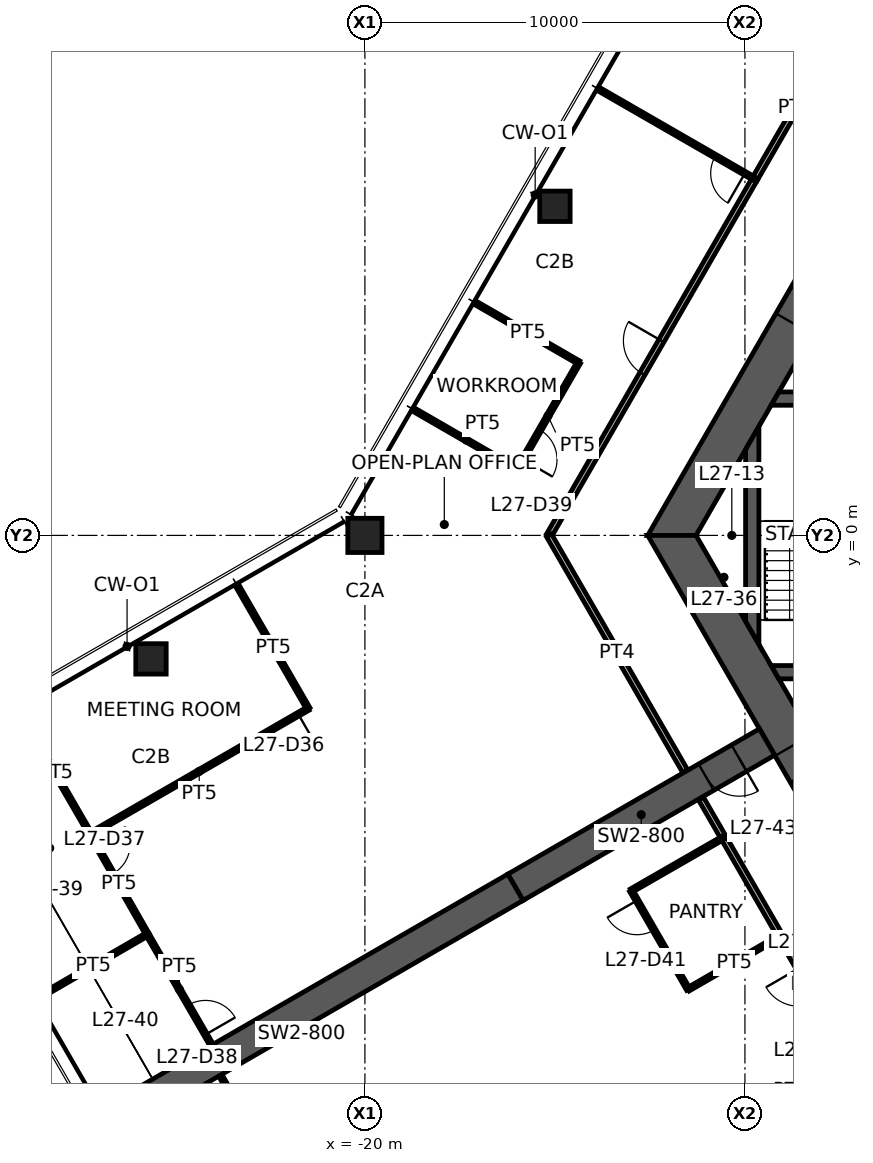
"""IFC4 building model, lengths in metres.
Left out: names, types, materials, properties, quantities, classifications, styles, units other than length and angle.
Written with IfcOpenShell. Run it as: python <this file> out.ifc"""

import sys

from ifc_helpers import new_model, si_unit, direction, frame, frame_2d, origin, origin_2d, place, context, subcontext, project, spatial, polyline, rectangle, hollow_rectangle, outline, extrude, element, fill, save


model = new_model("IFC4")
c1 = context("Model", 3, precision=1e-05, world=origin(), true_north=direction((0.0, 1.0)))
c2 = subcontext(c1, "Body", "Model", "MODEL_VIEW")
j1 = project(units=[si_unit("LENGTHUNIT", "METRE"), si_unit("PLANEANGLEUNIT", "RADIAN")], contexts=[c1])
p1 = place(None, origin())
s1 = spatial("IfcSite", under=j1, at=p1, CompositionType="ELEMENT")
p2 = place(p1, origin())
s2 = spatial("IfcBuilding", under=s1, at=p2, CompositionType="ELEMENT")
p3 = place(p2, frame((0.0, 0.0, 108.0)))
s3 = spatial("IfcBuildingStorey", under=s2, at=p3, CompositionType="ELEMENT", Elevation=108.0)
p4 = place(p3, frame((-20.0, 0.0, 0.0), z_axis=(0.0, 0.0, 1.0), x_axis=(1.0, 0.0, 0.0)))
e1 = element("IfcColumn", 1, at=p4, inside=s3, PredefinedType="COLUMN", context=c2, shape_type="SweptSolid", body=[
    extrude(hollow_rectangle(XDim=0.9, YDim=0.9, WallThickness=0.055, at=origin_2d()), origin(), (0.0, 0.0, 1.0), 3.9),
])
for number, where, z_axis, x_axis in (
    (2, (-15.0, 8.66, 0.0), (0.0, 0.0, 1.0), (1.0, 0.0, 0.0)),
    (3, (-25.629, -3.25, 0.0), (0.0, 0.0, 1.0), (1.0, 0.0, 0.0)),
):
    element("IfcColumn", number, at=place(p3, frame(where, z_axis=z_axis, x_axis=x_axis)), inside=s3, PredefinedType="COLUMN", context=c2, shape_type="SweptSolid", body=[
        extrude(hollow_rectangle(XDim=0.8, YDim=0.8, WallThickness=0.045, at=origin_2d()), origin(), (0.0, 0.0, 1.0), 3.9),
    ])
p5 = place(p3, frame((-5.961, 10.325, 0.0), z_axis=(0.0, 0.0, 1.0), x_axis=(-0.500004296715, -0.866022923061, 0.0)))
e4 = element("IfcWall", 4, at=p5, inside=s3, PredefinedType="SHEAR", context=c2, shape_type="SweptSolid", body=[
    extrude(outline(polyline([(-0.318, -0.55), (4.494, -0.55), (5.494, -0.55), (12.24, -0.55), (11.605, 0.55), (5.494, 0.55), (4.494, 0.55), (0.318, 0.55), (-0.318, -0.55)])), origin(), (0.0, 0.0, 1.0), 3.9),
])
p6 = place(p5, frame((4.494, 0.0, 0.0)))
e5 = element("IfcOpeningElement", 5, at=p6, cuts=e4, PredefinedType="OPENING", context=c2, shape_type="SweptSolid", body=[
    extrude(rectangle(XDim=1.0, YDim=2.1, at=frame_2d((0.5, 1.05))), frame((0.0, 0.56, 0.0), z_axis=(0.0, -1.0, 0.0), x_axis=(1.0, 0.0, 0.0)), (0.0, 0.0, 1.0), 1.12),
])
p7 = place(p3, frame((-11.922, 0.0, 0.0), z_axis=(0.0, 0.0, 1.0), x_axis=(0.500004296715, -0.866022923061, 0.0)))
e6 = element("IfcWall", 6, at=p7, inside=s3, PredefinedType="SHEAR", context=c2, shape_type="SweptSolid", body=[
    extrude(outline(polyline([(-0.318, -0.55), (6.381, -0.55), (7.181, -0.55), (12.24, -0.55), (11.605, 0.55), (7.181, 0.55), (6.381, 0.55), (0.318, 0.55), (-0.318, -0.55)])), origin(), (0.0, 0.0, 1.0), 3.9),
])
p8 = place(p7, frame((6.381, 0.0, 0.0)))
e7 = element("IfcOpeningElement", 7, at=p8, cuts=e6, PredefinedType="OPENING", context=c2, shape_type="SweptSolid", body=[
    extrude(rectangle(XDim=0.8, YDim=2.1, at=frame_2d((0.4, 1.05))), frame((0.0, 0.56, 0.0), z_axis=(0.0, -1.0, 0.0), x_axis=(1.0, 0.0, 0.0)), (0.0, 0.0, 1.0), 1.12),
])
p9 = place(p3, frame((-9.418, -5.438, 0.0), z_axis=(0.0, 0.0, 1.0), x_axis=(-0.866029782078, -0.499992416496, 0.0)))
e8 = element("IfcWall", 8, at=p9, inside=s3, PredefinedType="SHEAR", context=c2, shape_type="SweptSolid", body=[
    extrude(rectangle(XDim=7.646, YDim=0.8, at=frame_2d((3.823, 0.0))), origin(), (0.0, 0.0, 1.0), 3.9),
])
p10 = place(p9, frame((0.85, 0.0, 0.0)))
e9 = element("IfcOpeningElement", 9, at=p10, cuts=e8, PredefinedType="OPENING", context=c2, shape_type="SweptSolid", body=[
    extrude(rectangle(XDim=1.0, YDim=2.1, at=frame_2d((0.5, 1.05))), frame((0.0, 0.41, 0.0), z_axis=(0.0, -1.0, 0.0), x_axis=(1.0, 0.0, 0.0)), (0.0, 0.0, 1.0), 0.82),
])
p11 = place(p3, frame((-16.039, -9.26, 0.0), z_axis=(0.0, 0.0, 1.0), x_axis=(-0.866024837091, -0.50000098154, 0.0)))
e10 = element("IfcWall", 10, at=p11, inside=s3, PredefinedType="SHEAR", context=c2, shape_type="SweptSolid", body=[
    extrude(rectangle(XDim=13.0, YDim=0.8, at=frame_2d((6.5, 0.0))), origin(), (0.0, 0.0, 1.0), 3.9),
])
p12 = place(p3, frame((-9.209, 3.6, 0.0), z_axis=(0.0, 0.0, 1.0), x_axis=(1.0, 0.0, 0.0)))
e11 = element("IfcWall", 11, at=p12, inside=s3, PredefinedType="SHEAR", context=c2, shape_type="SweptSolid", body=[
    extrude(outline(polyline([(-0.101, -0.175), (3.209, -0.175), (4.209, -0.175), (5.609, -0.175), (6.709, -0.175), (7.784, -0.175), (7.784, 0.175), (6.709, 0.175), (5.609, 0.175), (4.209, 0.175), (3.209, 0.175), (0.101, 0.175), (-0.101, -0.175)])), origin(), (0.0, 0.0, 1.0), 3.9),
])
p13 = place(p12, frame((3.209, 0.0, 0.0)))
e12 = element("IfcOpeningElement", 12, at=p13, cuts=e11, PredefinedType="OPENING", context=c2, shape_type="SweptSolid", body=[
    extrude(rectangle(XDim=1.0, YDim=2.1, at=frame_2d((0.5, 1.05))), frame((0.0, 0.185, 0.0), z_axis=(0.0, -1.0, 0.0), x_axis=(1.0, 0.0, 0.0)), (0.0, 0.0, 1.0), 0.37),
])
p14 = place(p12, frame((5.609, 0.0, 0.0)))
e13 = element("IfcOpeningElement", 13, at=p14, cuts=e11, PredefinedType="OPENING", context=c2, shape_type="SweptSolid", body=[
    extrude(rectangle(XDim=1.1, YDim=2.1, at=frame_2d((0.55, 1.05))), frame((0.0, 0.185, 0.0), z_axis=(0.0, -1.0, 0.0), x_axis=(1.0, 0.0, 0.0)), (0.0, 0.0, 1.0), 0.37),
])
p15 = place(p3, frame((-9.209, -3.6, 0.0), z_axis=(0.0, 0.0, 1.0), x_axis=(1.0, 0.0, 0.0)))
e14 = element("IfcWall", 14, at=p15, inside=s3, PredefinedType="SHEAR", context=c2, shape_type="SweptSolid", body=[
    extrude(outline(polyline([(0.101, -0.175), (3.059, -0.175), (4.359, -0.175), (5.609, -0.175), (6.709, -0.175), (7.784, -0.175), (7.784, 0.175), (6.709, 0.175), (5.609, 0.175), (4.359, 0.175), (3.059, 0.175), (-0.101, 0.175), (0.101, -0.175)])), origin(), (0.0, 0.0, 1.0), 3.9),
])
p16 = place(p15, frame((5.609, 0.0, 0.0)))
e15 = element("IfcOpeningElement", 15, at=p16, cuts=e14, PredefinedType="OPENING", context=c2, shape_type="SweptSolid", body=[
    extrude(rectangle(XDim=1.1, YDim=2.1, at=frame_2d((0.55, 1.05))), frame((0.0, 0.185, 0.0), z_axis=(0.0, -1.0, 0.0), x_axis=(1.0, 0.0, 0.0)), (0.0, 0.0, 1.0), 0.37),
])
p17 = place(p15, frame((3.059, 0.0, 0.0)))
e16 = element("IfcOpeningElement", 16, at=p17, cuts=e14, PredefinedType="OPENING", context=c2, shape_type="SweptSolid", body=[
    extrude(rectangle(XDim=1.3, YDim=2.1, at=frame_2d((0.65, 1.05))), frame((0.0, 0.185, 0.0), z_axis=(0.0, -1.0, 0.0), x_axis=(1.0, 0.0, 0.0)), (0.0, 0.0, 1.0), 0.37),
])
p18 = place(p3, frame((-9.808, -2.562, 0.0), z_axis=(0.0, 0.0, 1.0), x_axis=(0.0, 1.0, 0.0)))
e17 = element("IfcWall", 17, at=p18, inside=s3, PredefinedType="SHEAR", context=c2, shape_type="SweptSolid", body=[
    extrude(outline(polyline([(-0.303, -0.175), (5.428, -0.175), (4.821, 0.175), (0.303, 0.175), (-0.303, -0.175)])), origin(), (0.0, 0.0, 1.0), 3.9),
])
p19 = place(p3, frame((-7.578, -13.125, 0.0), z_axis=(0.0, 0.0, 1.0), x_axis=(-0.500008905493, -0.866020262135, 0.0)))
e18 = element("IfcWall", 18, at=p19, inside=s3, PredefinedType="PARTITIONING", context=c2, shape_type="SweptSolid", body=[
    extrude(rectangle(XDim=4.845, YDim=0.175, at=frame_2d((2.422, 0.0))), origin(), (0.0, 0.0, 1.0), 3.05),
])
p20 = place(p19, frame((0.7, 0.0, 0.0)))
e19 = element("IfcOpeningElement", 19, at=p20, cuts=e18, PredefinedType="OPENING", context=c2, shape_type="SweptSolid", body=[
    extrude(rectangle(XDim=1.0, YDim=2.1, at=frame_2d((0.5, 1.05))), frame((0.0, 0.098, 0.0), z_axis=(0.0, -1.0, 0.0), x_axis=(1.0, 0.0, 0.0)), (0.0, 0.0, 1.0), 0.195),
])
p21 = place(p3, frame((-9.746, 9.37, 0.0), z_axis=(0.0, 0.0, 1.0), x_axis=(0.499980509014, 0.866036656618, 0.0)))
e20 = element("IfcWall", 20, at=p21, inside=s3, PredefinedType="PARTITIONING", context=c2, shape_type="SweptSolid", body=[
    extrude(rectangle(XDim=4.313, YDim=0.15, at=frame_2d((2.157, 0.0))), origin(), (0.0, 0.0, 1.0), 2.95),
])
p22 = place(p3, frame((-15.156, 0.0, 0.0), z_axis=(0.0, 0.0, 1.0), x_axis=(0.500006743721, 0.866021510261, 0.0)))
e21 = element("IfcWall", 21, at=p22, inside=s3, PredefinedType="PARTITIONING", context=c2, shape_type="SweptSolid", body=[
    extrude(rectangle(XDim=10.828, YDim=0.15, at=frame_2d((5.414, 0.0))), origin(), (0.0, 0.0, 1.0), 2.95),
])
p23 = place(p22, frame((4.914, 0.0, 0.0)))
e22 = element("IfcOpeningElement", 22, at=p23, cuts=e21, PredefinedType="OPENING", context=c2, shape_type="SweptSolid", body=[
    extrude(rectangle(XDim=1.0, YDim=2.1, at=frame_2d((0.5, 1.05))), frame((0.0, 0.085, 0.0), z_axis=(0.0, -1.0, 0.0), x_axis=(1.0, 0.0, 0.0)), (0.0, 0.0, 1.0), 0.17),
])
p24 = place(p3, frame((-11.577, -6.199, 0.0), z_axis=(0.0, 0.0, 1.0), x_axis=(-0.500001961223, 0.866024271469, 0.0)))
e23 = element("IfcWall", 23, at=p24, inside=s3, PredefinedType="PARTITIONING", context=c2, shape_type="SweptSolid", body=[
    extrude(rectangle(XDim=7.158, YDim=0.15, at=frame_2d((3.579, 0.0))), origin(), (0.0, 0.0, 1.0), 2.95),
])
p25 = place(p3, frame((-9.741, 9.378, 0.0), z_axis=(0.0, 0.0, 1.0), x_axis=(-0.866493666502, 0.499188066675, 0.0)))
e24 = element("IfcWall", 24, at=p25, inside=s3, PredefinedType="PARTITIONING", context=c2, shape_type="SweptSolid", body=[
    extrude(rectangle(XDim=4.72, YDim=0.1, at=frame_2d((2.36, 0.0))), origin(), (0.0, 0.0, 1.0), 2.95),
])
p26 = place(p25, frame((0.3, 0.0, 0.0)))
e25 = element("IfcOpeningElement", 25, at=p26, cuts=e24, PredefinedType="OPENING", context=c2, shape_type="SweptSolid", body=[
    extrude(rectangle(XDim=0.9, YDim=2.1, at=frame_2d((0.45, 1.05))), frame((0.0, 0.06, 0.0), z_axis=(0.0, -1.0, 0.0), x_axis=(1.0, 0.0, 0.0)), (0.0, 0.0, 1.0), 0.12),
])
p27 = place(p3, frame((-27.22, -7.864, 0.0), z_axis=(0.0, 0.0, 1.0), x_axis=(-0.501296359072, 0.86527565572, 0.0)))
e26 = element("IfcWall", 26, at=p27, inside=s3, PredefinedType="PARTITIONING", context=c2, shape_type="SweptSolid", body=[
    extrude(rectangle(XDim=3.7, YDim=0.1, at=frame_2d((1.85, 0.0))), origin(), (0.0, 0.0, 1.0), 2.95),
])
p28 = place(p3, frame((-23.332, -1.37, 0.0), z_axis=(0.0, 0.0, 1.0), x_axis=(0.500013413428, -0.866017659399, 0.0)))
e27 = element("IfcWall", 27, at=p28, inside=s3, PredefinedType="PARTITIONING", context=c2, shape_type="SweptSolid", body=[
    extrude(rectangle(XDim=3.68, YDim=0.1, at=frame_2d((1.84, 0.0))), origin(), (0.0, 0.0, 1.0), 2.95),
])
p29 = place(p3, frame((-21.492, -4.557, 0.0), z_axis=(0.0, 0.0, 1.0), x_axis=(-0.866343956507, -0.499447844147, 0.0)))
e28 = element("IfcWall", 28, at=p29, inside=s3, PredefinedType="PARTITIONING", context=c2, shape_type="SweptSolid", body=[
    extrude(rectangle(XDim=6.62, YDim=0.1, at=frame_2d((3.31, 0.0))), origin(), (0.0, 0.0, 1.0), 2.95),
])
p30 = place(p29, frame((0.3, 0.0, 0.0)))
e29 = element("IfcOpeningElement", 29, at=p30, cuts=e28, PredefinedType="OPENING", context=c2, shape_type="SweptSolid", body=[
    extrude(rectangle(XDim=0.9, YDim=2.1, at=frame_2d((0.45, 1.05))), frame((0.0, 0.06, 0.0), z_axis=(0.0, -1.0, 0.0), x_axis=(1.0, 0.0, 0.0)), (0.0, 0.0, 1.0), 0.12),
])
p31 = place(p3, frame((-25.719, -10.493, 0.0), z_axis=(0.0, 0.0, 1.0), x_axis=(-0.865269267775, -0.501307384988, 0.0)))
e30 = element("IfcWall", 30, at=p31, inside=s3, PredefinedType="PARTITIONING", context=c2, shape_type="SweptSolid", body=[
    extrude(rectangle(XDim=3.301, YDim=0.1, at=frame_2d((1.65, 0.0))), origin(), (0.0, 0.0, 1.0), 2.95),
])
p32 = place(p3, frame((-27.227, -7.863, 0.0), z_axis=(0.0, 0.0, 1.0), x_axis=(0.495913871635, -0.868371712989, 0.0)))
e31 = element("IfcWall", 31, at=p32, inside=s3, PredefinedType="PARTITIONING", context=c2, shape_type="SweptSolid", body=[
    extrude(rectangle(XDim=3.038, YDim=0.1, at=frame_2d((1.519, 0.0))), origin(), (0.0, 0.0, 1.0), 2.95),
])
p33 = place(p32, frame((0.3, 0.0, 0.0)))
e32 = element("IfcOpeningElement", 32, at=p33, cuts=e31, PredefinedType="OPENING", context=c2, shape_type="SweptSolid", body=[
    extrude(rectangle(XDim=0.9, YDim=2.1, at=frame_2d((0.45, 1.05))), frame((0.0, 0.06, 0.0), z_axis=(0.0, -1.0, 0.0), x_axis=(1.0, 0.0, 0.0)), (0.0, 0.0, 1.0), 0.12),
])
p34 = place(p3, frame((-25.72, -10.5, 0.0), z_axis=(0.0, 0.0, 1.0), x_axis=(0.501088030279, -0.865396317251, 0.0)))
e33 = element("IfcWall", 33, at=p34, inside=s3, PredefinedType="PARTITIONING", context=c2, shape_type="SweptSolid", body=[
    extrude(rectangle(XDim=3.347, YDim=0.1, at=frame_2d((1.673, 0.0))), origin(), (0.0, 0.0, 1.0), 2.95),
])
p35 = place(p34, frame((2.147, 0.0, 0.0)))
e34 = element("IfcOpeningElement", 34, at=p35, cuts=e33, PredefinedType="OPENING", context=c2, shape_type="SweptSolid", body=[
    extrude(rectangle(XDim=0.9, YDim=2.1, at=frame_2d((0.45, 1.05))), frame((0.0, 0.06, 0.0), z_axis=(0.0, -1.0, 0.0), x_axis=(1.0, 0.0, 0.0)), (0.0, 0.0, 1.0), 0.12),
])
p36 = place(p3, frame((-17.056, 6.099, 0.0), z_axis=(0.0, 0.0, 1.0), x_axis=(0.86600983753, -0.500026960575, 0.0)))
e35 = element("IfcWall", 35, at=p36, inside=s3, PredefinedType="PARTITIONING", context=c2, shape_type="SweptSolid", body=[
    extrude(rectangle(XDim=3.1, YDim=0.1, at=frame_2d((1.55, 0.0))), origin(), (0.0, 0.0, 1.0), 2.95),
])
p37 = place(p3, frame((-15.995, 1.737, 0.0), z_axis=(0.0, 0.0, 1.0), x_axis=(-0.866029832698, 0.499992328818, 0.0)))
e36 = element("IfcWall", 36, at=p37, inside=s3, PredefinedType="PARTITIONING", context=c2, shape_type="SweptSolid", body=[
    extrude(rectangle(XDim=3.08, YDim=0.1, at=frame_2d((1.54, 0.0))), origin(), (0.0, 0.0, 1.0), 2.95),
])
p38 = place(p3, frame((-14.372, 4.549, 0.0), z_axis=(0.0, 0.0, 1.0), x_axis=(-0.499956811548, -0.866050337213, 0.0)))
e37 = element("IfcWall", 37, at=p38, inside=s3, PredefinedType="PARTITIONING", context=c2, shape_type="SweptSolid", body=[
    extrude(rectangle(XDim=3.246, YDim=0.1, at=frame_2d((1.623, 0.0))), origin(), (0.0, 0.0, 1.0), 2.95),
])
p39 = place(p38, frame((2.046, 0.0, 0.0)))
e38 = element("IfcOpeningElement", 38, at=p39, cuts=e37, PredefinedType="OPENING", context=c2, shape_type="SweptSolid", body=[
    extrude(rectangle(XDim=0.9, YDim=2.1, at=frame_2d((0.45, 1.05))), frame((0.0, 0.06, 0.0), z_axis=(0.0, -1.0, 0.0), x_axis=(1.0, 0.0, 0.0)), (0.0, 0.0, 1.0), 0.12),
])
p40 = place(p3, frame((-9.064, -10.551, 0.0), z_axis=(0.0, 0.0, 1.0), x_axis=(-0.499977562641, 0.866038357612, 0.0)))
e39 = element("IfcWall", 39, at=p40, inside=s3, PredefinedType="PARTITIONING", context=c2, shape_type="SweptSolid", body=[
    extrude(rectangle(XDim=3.01, YDim=0.15, at=frame_2d((1.505, 0.0))), origin(), (0.0, 0.0, 1.0), 2.95),
])
p41 = place(p3, frame((-10.564, -7.952, 0.0), z_axis=(0.0, 0.0, 1.0), x_axis=(-0.500085263423, 0.865976171327, 0.0)))
e40 = element("IfcWall", 40, at=p41, inside=s3, PredefinedType="PARTITIONING", context=c2, shape_type="SweptSolid", body=[
    extrude(rectangle(XDim=1.184, YDim=0.15, at=frame_2d((0.592, 0.0))), origin(), (0.0, 0.0, 1.0), 2.95),
])
p42 = place(p3, frame((-7.589, -13.105, 0.0), z_axis=(0.0, 0.0, 1.0), x_axis=(-0.499972416139, 0.866041328748, 0.0)))
e41 = element("IfcWall", 41, at=p42, inside=s3, PredefinedType="PARTITIONING", context=c2, shape_type="SweptSolid", body=[
    extrude(rectangle(XDim=2.959, YDim=0.15, at=frame_2d((1.479, 0.0))), origin(), (0.0, 0.0, 1.0), 2.95),
])
p43 = place(p42, frame((0.979, 0.0, 0.0)))
e42 = element("IfcOpeningElement", 42, at=p43, cuts=e41, PredefinedType="OPENING", context=c2, shape_type="SweptSolid", body=[
    extrude(rectangle(XDim=1.0, YDim=2.1, at=frame_2d((0.5, 1.05))), frame((0.0, 0.085, 0.0), z_axis=(0.0, -1.0, 0.0), x_axis=(1.0, 0.0, 0.0)), (0.0, 0.0, 1.0), 0.17),
])
p44 = place(p3, frame((-12.991, -9.348, 0.0), z_axis=(0.0, 0.0, 1.0), x_axis=(0.866817750494, 0.498625097071, 0.0)))
e43 = element("IfcWall", 43, at=p44, inside=s3, PredefinedType="PARTITIONING", context=c2, shape_type="SweptSolid", body=[
    extrude(rectangle(XDim=2.8, YDim=0.1, at=frame_2d((1.4, 0.0))), origin(), (0.0, 0.0, 1.0), 2.95),
])
p45 = place(p3, frame((-11.491, -11.946, 0.0), z_axis=(0.0, 0.0, 1.0), x_axis=(-0.499990139034, 0.866031096941, 0.0)))
e44 = element("IfcWall", 44, at=p45, inside=s3, PredefinedType="PARTITIONING", context=c2, shape_type="SweptSolid", body=[
    extrude(rectangle(XDim=3.0, YDim=0.1, at=frame_2d((1.5, 0.0))), origin(), (0.0, 0.0, 1.0), 2.95),
])
p46 = place(p45, frame((1.8, 0.0, 0.0)))
e45 = element("IfcOpeningElement", 45, at=p46, cuts=e44, PredefinedType="OPENING", context=c2, shape_type="SweptSolid", body=[
    extrude(rectangle(XDim=0.9, YDim=2.1, at=frame_2d((0.45, 1.05))), frame((0.0, 0.06, 0.0), z_axis=(0.0, -1.0, 0.0), x_axis=(1.0, 0.0, 0.0)), (0.0, 0.0, 1.0), 0.12),
])
p47 = place(p3, frame((-9.069, -10.542, 0.0), z_axis=(0.0, 0.0, 1.0), x_axis=(-0.865195372903, -0.501434907746, 0.0)))
e46 = element("IfcWall", 46, at=p47, inside=s3, PredefinedType="PARTITIONING", context=c2, shape_type="SweptSolid", body=[
    extrude(rectangle(XDim=2.8, YDim=0.1, at=frame_2d((1.4, 0.0))), origin(), (0.0, 0.0, 1.0), 2.95),
])
p48 = place(p3, frame((-23.797, -14.224, 0.0), z_axis=(0.0, 0.0, 1.0), x_axis=(0.500015043844, -0.866016718043, 0.0)))
e47 = element("IfcWall", 47, at=p48, inside=s3, PredefinedType="PARTITIONING", context=c2, shape_type="SweptSolid", body=[
    extrude(rectangle(XDim=3.347, YDim=0.1, at=frame_2d((1.673, 0.0))), origin(), (0.0, 0.0, 1.0), 2.95),
])
p49 = place(p48, frame((2.147, 0.0, 0.0)))
e48 = element("IfcOpeningElement", 48, at=p49, cuts=e47, PredefinedType="OPENING", context=c2, shape_type="SweptSolid", body=[
    extrude(rectangle(XDim=0.9, YDim=2.1, at=frame_2d((0.45, 1.05))), frame((0.0, 0.06, 0.0), z_axis=(0.0, -1.0, 0.0), x_axis=(1.0, 0.0, 0.0)), (0.0, 0.0, 1.0), 0.12),
])
p50 = place(p8, origin())
e49 = element("IfcDoor", 49, at=p50, inside=s3, OperationType="SINGLE_SWING_RIGHT", PredefinedType="DOOR", context=c2, shape_type="SweptSolid", body=[
    extrude(rectangle(XDim=0.8, YDim=2.1, at=frame_2d((0.4, 1.05))), frame((0.0, 0.025, 0.0), z_axis=(0.0, -1.0, 0.0), x_axis=(1.0, 0.0, 0.0)), (0.0, 0.0, 1.0), 0.05),
])
fill(e7, e49)
p51 = place(p10, origin())
e50 = element("IfcDoor", 50, at=p51, inside=s3, OperationType="SINGLE_SWING_LEFT", PredefinedType="DOOR", context=c2, shape_type="SweptSolid", body=[
    extrude(rectangle(XDim=1.0, YDim=2.1, at=frame_2d((0.5, 1.05))), frame((0.0, 0.025, 0.0), z_axis=(0.0, -1.0, 0.0), x_axis=(1.0, 0.0, 0.0)), (0.0, 0.0, 1.0), 0.05),
])
fill(e9, e50)
p52 = place(p23, origin())
e51 = element("IfcDoor", 51, at=p52, inside=s3, OperationType="SINGLE_SWING_RIGHT", PredefinedType="DOOR", context=c2, shape_type="SweptSolid", body=[
    extrude(rectangle(XDim=1.0, YDim=2.1, at=frame_2d((0.5, 1.05))), frame((0.0, 0.025, 0.0), z_axis=(0.0, -1.0, 0.0), x_axis=(1.0, 0.0, 0.0)), (0.0, 0.0, 1.0), 0.05),
])
fill(e22, e51)
p53 = place(p26, origin())
e52 = element("IfcDoor", 52, at=p53, inside=s3, OperationType="SINGLE_SWING_LEFT", PredefinedType="DOOR", context=c2, shape_type="SweptSolid", body=[
    extrude(rectangle(XDim=0.9, YDim=2.1, at=frame_2d((0.45, 1.05))), frame((0.0, 0.025, 0.0), z_axis=(0.0, -1.0, 0.0), x_axis=(1.0, 0.0, 0.0)), (0.0, 0.0, 1.0), 0.05),
])
fill(e25, e52)
p54 = place(p30, origin())
e53 = element("IfcDoor", 53, at=p54, inside=s3, OperationType="SINGLE_SWING_LEFT", PredefinedType="DOOR", context=c2, shape_type="SweptSolid", body=[
    extrude(rectangle(XDim=0.9, YDim=2.1, at=frame_2d((0.45, 1.05))), frame((0.0, 0.025, 0.0), z_axis=(0.0, -1.0, 0.0), x_axis=(1.0, 0.0, 0.0)), (0.0, 0.0, 1.0), 0.05),
])
fill(e29, e53)
p55 = place(p33, origin())
e54 = element("IfcDoor", 54, at=p55, inside=s3, OperationType="SINGLE_SWING_LEFT", PredefinedType="DOOR", context=c2, shape_type="SweptSolid", body=[
    extrude(rectangle(XDim=0.9, YDim=2.1, at=frame_2d((0.45, 1.05))), frame((0.0, 0.025, 0.0), z_axis=(0.0, -1.0, 0.0), x_axis=(1.0, 0.0, 0.0)), (0.0, 0.0, 1.0), 0.05),
])
fill(e32, e54)
p56 = place(p35, origin())
e55 = element("IfcDoor", 55, at=p56, inside=s3, OperationType="SINGLE_SWING_RIGHT", PredefinedType="DOOR", context=c2, shape_type="SweptSolid", body=[
    extrude(rectangle(XDim=0.9, YDim=2.1, at=frame_2d((0.45, 1.05))), frame((0.0, 0.025, 0.0), z_axis=(0.0, -1.0, 0.0), x_axis=(1.0, 0.0, 0.0)), (0.0, 0.0, 1.0), 0.05),
])
fill(e34, e55)
p57 = place(p39, origin())
e56 = element("IfcDoor", 56, at=p57, inside=s3, OperationType="SINGLE_SWING_RIGHT", PredefinedType="DOOR", context=c2, shape_type="SweptSolid", body=[
    extrude(rectangle(XDim=0.9, YDim=2.1, at=frame_2d((0.45, 1.05))), frame((0.0, 0.025, 0.0), z_axis=(0.0, -1.0, 0.0), x_axis=(1.0, 0.0, 0.0)), (0.0, 0.0, 1.0), 0.05),
])
fill(e38, e56)
p58 = place(p46, origin())
e57 = element("IfcDoor", 57, at=p58, inside=s3, OperationType="SINGLE_SWING_RIGHT", PredefinedType="DOOR", context=c2, shape_type="SweptSolid", body=[
    extrude(rectangle(XDim=0.9, YDim=2.1, at=frame_2d((0.45, 1.05))), frame((0.0, 0.025, 0.0), z_axis=(0.0, -1.0, 0.0), x_axis=(1.0, 0.0, 0.0)), (0.0, 0.0, 1.0), 0.05),
])
fill(e45, e57)
save(model, sys.argv[1])
